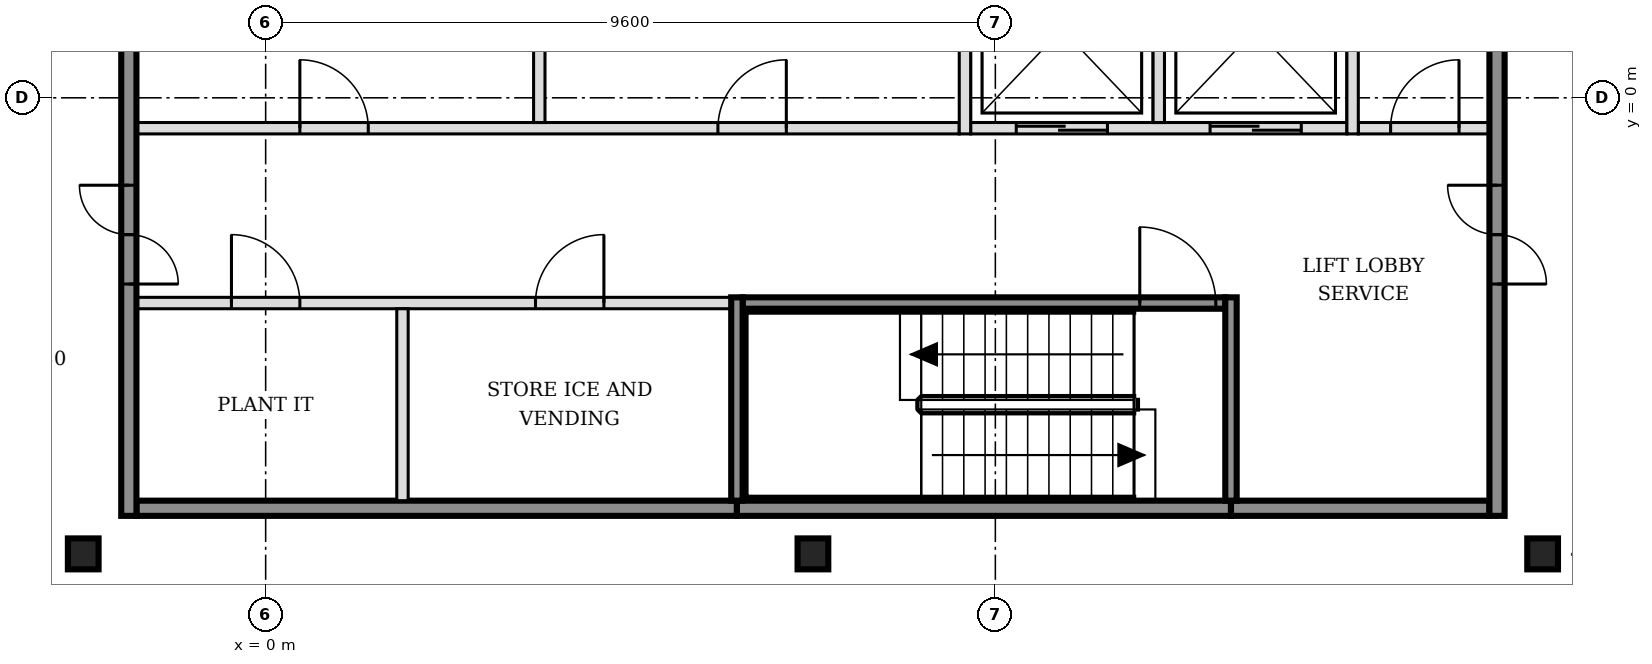
"""IFC4 building model, lengths in metres.
Left out: names, types, materials, properties, quantities, classifications, styles, units other than length and angle.
Written with IfcOpenShell. Run it as: python <this file> out.ifc"""

import sys

from ifc_helpers import new_model, si_unit, direction, frame, frame_2d, origin, origin_2d, place, context, subcontext, project, spatial, rectangle, i_section, extrude, element, fill, save


model = new_model("IFC4")
c1 = context("Model", 3, precision=1e-05, world=origin(), true_north=direction((0.0, 1.0)))
c2 = subcontext(c1, "Body", "Model", "MODEL_VIEW")
j1 = project(units=[si_unit("LENGTHUNIT", "METRE"), si_unit("PLANEANGLEUNIT", "RADIAN")], contexts=[c1])
p1 = place(None, origin())
s1 = spatial("IfcSite", under=j1, at=p1, CompositionType="ELEMENT")
p2 = place(p1, origin())
s2 = spatial("IfcBuilding", under=s1, at=p2, CompositionType="ELEMENT")
p3 = place(p2, frame((0.0, 0.0, 225.0)))
s3 = spatial("IfcBuildingStorey", under=s2, at=p3, CompositionType="ELEMENT", Elevation=225.0)
for number, where, z_axis, x_axis in (
    (1, (-2.4, -6.0, -0.15), (0.0, 0.0, 1.0), (1.0, 0.0, 0.0)),
    (2, (7.2, -6.0, -0.15), (0.0, 0.0, 1.0), (1.0, 0.0, 0.0)),
    (3, (16.8, -6.0, -0.15), (0.0, 0.0, 1.0), (1.0, 0.0, 0.0)),
):
    element("IfcColumn", number, at=place(p3, frame(where, z_axis=z_axis, x_axis=x_axis)), inside=s3, PredefinedType="COLUMN", context=c2, shape_type="SweptSolid", body=[
        extrude(i_section(OverallWidth=0.404, OverallDepth=0.407, WebThickness=0.027, FlangeThickness=0.044, FilletRadius=0.015, at=origin_2d()), origin(), (0.0, 0.0, 1.0), 3.6),
    ])
p4 = place(p3, frame((-1.7, -5.4, 0.0), z_axis=(0.0, 0.0, 1.0), x_axis=(1.0, 0.0, 0.0)))
e4 = element("IfcWall", 4, at=p4, inside=s3, PredefinedType="SOLIDWALL", context=c2, shape_type="SweptSolid", body=[
    extrude(rectangle(XDim=7.9, YDim=0.2, at=frame_2d((3.95, 0.0))), origin(), (0.0, 0.0, 1.0), 3.45),
])
p5 = place(p3, frame((6.2, -5.4, 0.0), z_axis=(0.0, 0.0, 1.0), x_axis=(1.0, 0.0, 0.0)))
e5 = element("IfcWall", 5, at=p5, inside=s3, PredefinedType="SOLIDWALL", context=c2, shape_type="SweptSolid", body=[
    extrude(rectangle(XDim=6.5, YDim=0.2, at=frame_2d((3.25, 0.0))), origin(), (0.0, 0.0, 1.0), 3.45),
])
p6 = place(p3, frame((12.7, -5.4, 0.0), z_axis=(0.0, 0.0, 1.0), x_axis=(1.0, 0.0, 0.0)))
e6 = element("IfcWall", 6, at=p6, inside=s3, PredefinedType="SOLIDWALL", context=c2, shape_type="SweptSolid", body=[
    extrude(rectangle(XDim=3.4, YDim=0.2, at=frame_2d((1.7, 0.0))), origin(), (0.0, 0.0, 1.0), 3.45),
])
p7 = place(p3, frame((-1.7, -2.7, 0.0), z_axis=(0.0, 0.0, 1.0), x_axis=(1.0, 0.0, 0.0)))
e7 = element("IfcWall", 7, at=p7, inside=s3, PredefinedType="PARTITIONING", context=c2, shape_type="SweptSolid", body=[
    extrude(rectangle(XDim=7.825, YDim=0.15, at=frame_2d((3.913, 0.0))), origin(), (0.0, 0.0, 1.0), 3.45),
])
p8 = place(p7, frame((1.25, 0.0, 0.0)))
e8 = element("IfcOpeningElement", 8, at=p8, cuts=e7, PredefinedType="OPENING", context=c2, shape_type="SweptSolid", body=[
    extrude(rectangle(XDim=0.9, YDim=2.1, at=frame_2d((0.45, 1.05))), frame((0.0, 0.085, 0.0), z_axis=(0.0, -1.0, 0.0), x_axis=(1.0, 0.0, 0.0)), (0.0, 0.0, 1.0), 0.17),
])
p9 = place(p7, frame((5.25, 0.0, 0.0)))
e9 = element("IfcOpeningElement", 9, at=p9, cuts=e7, PredefinedType="OPENING", context=c2, shape_type="SweptSolid", body=[
    extrude(rectangle(XDim=0.9, YDim=2.1, at=frame_2d((0.45, 1.05))), frame((0.0, 0.085, 0.0), z_axis=(0.0, -1.0, 0.0), x_axis=(1.0, 0.0, 0.0)), (0.0, 0.0, 1.0), 0.17),
])
p10 = place(p3, frame((6.275, -2.7, 0.0), z_axis=(0.0, 0.0, 1.0), x_axis=(1.0, 0.0, 0.0)))
e10 = element("IfcWall", 10, at=p10, inside=s3, PredefinedType="SOLIDWALL", context=c2, shape_type="SweptSolid", body=[
    extrude(rectangle(XDim=6.35, YDim=0.15, at=frame_2d((3.175, 0.0))), origin(), (0.0, 0.0, 1.0), 3.45),
])
p11 = place(p10, frame((5.225, 0.0, 0.0)))
e11 = element("IfcOpeningElement", 11, at=p11, cuts=e10, PredefinedType="OPENING", context=c2, shape_type="SweptSolid", body=[
    extrude(rectangle(XDim=1.0, YDim=2.1, at=frame_2d((0.5, 1.05))), frame((0.0, 0.085, 0.0), z_axis=(0.0, -1.0, 0.0), x_axis=(1.0, 0.0, 0.0)), (0.0, 0.0, 1.0), 0.17),
])
p12 = place(p3, frame((-1.7, -0.4, 0.0), z_axis=(0.0, 0.0, 1.0), x_axis=(1.0, 0.0, 0.0)))
e12 = element("IfcWall", 12, at=p12, inside=s3, PredefinedType="PARTITIONING", context=c2, shape_type="SweptSolid", body=[
    extrude(rectangle(XDim=10.825, YDim=0.15, at=frame_2d((5.413, 0.0))), origin(), (0.0, 0.0, 1.0), 3.45),
])
p13 = place(p12, frame((2.15, 0.0, 0.0)))
e13 = element("IfcOpeningElement", 13, at=p13, cuts=e12, PredefinedType="OPENING", context=c2, shape_type="SweptSolid", body=[
    extrude(rectangle(XDim=0.9, YDim=2.1, at=frame_2d((0.45, 1.05))), frame((0.0, 0.085, 0.0), z_axis=(0.0, -1.0, 0.0), x_axis=(1.0, 0.0, 0.0)), (0.0, 0.0, 1.0), 0.17),
])
p14 = place(p12, frame((7.65, 0.0, 0.0)))
e14 = element("IfcOpeningElement", 14, at=p14, cuts=e12, PredefinedType="OPENING", context=c2, shape_type="SweptSolid", body=[
    extrude(rectangle(XDim=0.9, YDim=2.1, at=frame_2d((0.45, 1.05))), frame((0.0, 0.085, 0.0), z_axis=(0.0, -1.0, 0.0), x_axis=(1.0, 0.0, 0.0)), (0.0, 0.0, 1.0), 0.17),
])
p15 = place(p3, frame((9.275, -0.4, 0.0), z_axis=(0.0, 0.0, 1.0), x_axis=(1.0, 0.0, 0.0)))
e15 = element("IfcWall", 15, at=p15, inside=s3, PredefinedType="SOLIDWALL", context=c2, shape_type="SweptSolid", body=[
    extrude(rectangle(XDim=4.95, YDim=0.15, at=frame_2d((2.475, 0.0))), origin(), (0.0, 0.0, 1.0), 3.45),
])
p16 = place(p15, frame((0.6, 0.0, 0.0)))
e16 = element("IfcOpeningElement", 16, at=p16, cuts=e15, PredefinedType="OPENING", context=c2, shape_type="SweptSolid", body=[
    extrude(rectangle(XDim=1.2, YDim=2.1, at=frame_2d((0.6, 1.05))), frame((0.0, 0.085, 0.0), z_axis=(0.0, -1.0, 0.0), x_axis=(1.0, 0.0, 0.0)), (0.0, 0.0, 1.0), 0.17),
])
p17 = place(p15, frame((3.15, 0.0, 0.0)))
e17 = element("IfcOpeningElement", 17, at=p17, cuts=e15, PredefinedType="OPENING", context=c2, shape_type="SweptSolid", body=[
    extrude(rectangle(XDim=1.2, YDim=2.1, at=frame_2d((0.6, 1.05))), frame((0.0, 0.085, 0.0), z_axis=(0.0, -1.0, 0.0), x_axis=(1.0, 0.0, 0.0)), (0.0, 0.0, 1.0), 0.17),
])
p18 = place(p3, frame((14.375, -0.4, 0.0), z_axis=(0.0, 0.0, 1.0), x_axis=(1.0, 0.0, 0.0)))
e18 = element("IfcWall", 18, at=p18, inside=s3, PredefinedType="PARTITIONING", context=c2, shape_type="SweptSolid", body=[
    extrude(rectangle(XDim=1.725, YDim=0.15, at=frame_2d((0.863, 0.0))), origin(), (0.0, 0.0, 1.0), 3.45),
])
p19 = place(p18, frame((0.425, 0.0, 0.0)))
e19 = element("IfcOpeningElement", 19, at=p19, cuts=e18, PredefinedType="OPENING", context=c2, shape_type="SweptSolid", body=[
    extrude(rectangle(XDim=0.9, YDim=2.1, at=frame_2d((0.45, 1.05))), frame((0.0, 0.085, 0.0), z_axis=(0.0, -1.0, 0.0), x_axis=(1.0, 0.0, 0.0)), (0.0, 0.0, 1.0), 0.17),
])
p20 = place(p3, frame((-1.8, -5.5, 0.0), z_axis=(0.0, 0.0, 1.0), x_axis=(0.0, 1.0, 0.0)))
e20 = element("IfcWall", 20, at=p20, inside=s3, PredefinedType="SOLIDWALL", context=c2, shape_type="SweptSolid", body=[
    extrude(rectangle(XDim=15.8, YDim=0.2, at=frame_2d((7.9, 0.0))), origin(), (0.0, 0.0, 1.0), 3.45),
])
p21 = place(p20, frame((3.05, 0.0, 0.0)))
e21 = element("IfcOpeningElement", 21, at=p21, cuts=e20, PredefinedType="OPENING", context=c2, shape_type="SweptSolid", body=[
    extrude(rectangle(XDim=1.3, YDim=2.1, at=frame_2d((0.65, 1.05))), frame((0.0, 0.11, 0.0), z_axis=(0.0, -1.0, 0.0), x_axis=(1.0, 0.0, 0.0)), (0.0, 0.0, 1.0), 0.22),
])
p22 = place(p20, frame((11.45, 0.0, 0.0)))
e22 = element("IfcOpeningElement", 22, at=p22, cuts=e20, PredefinedType="OPENING", context=c2, shape_type="SweptSolid", body=[
    extrude(rectangle(XDim=1.3, YDim=2.1, at=frame_2d((0.65, 1.05))), frame((0.0, 0.11, 0.0), z_axis=(0.0, -1.0, 0.0), x_axis=(1.0, 0.0, 0.0)), (0.0, 0.0, 1.0), 0.22),
])
p23 = place(p3, frame((1.8, -5.3, 0.0), z_axis=(0.0, 0.0, 1.0), x_axis=(0.0, 1.0, 0.0)))
e23 = element("IfcWall", 23, at=p23, inside=s3, PredefinedType="PARTITIONING", context=c2, shape_type="SweptSolid", body=[
    extrude(rectangle(XDim=2.525, YDim=0.15, at=frame_2d((1.263, 0.0))), origin(), (0.0, 0.0, 1.0), 3.45),
])
p24 = place(p3, frame((3.6, -0.325, 0.0), z_axis=(0.0, 0.0, 1.0), x_axis=(0.0, 1.0, 0.0)))
e24 = element("IfcWall", 24, at=p24, inside=s3, PredefinedType="PARTITIONING", context=c2, shape_type="SweptSolid", body=[
    extrude(rectangle(XDim=2.45, YDim=0.15, at=frame_2d((1.225, 0.0))), origin(), (0.0, 0.0, 1.0), 3.45),
])
p25 = place(p3, frame((6.2, -5.3, 0.0), z_axis=(0.0, 0.0, 1.0), x_axis=(0.0, 1.0, 0.0)))
e25 = element("IfcWall", 25, at=p25, inside=s3, PredefinedType="SOLIDWALL", context=c2, shape_type="SweptSolid", body=[
    extrude(rectangle(XDim=2.675, YDim=0.15, at=frame_2d((1.337, 0.0))), origin(), (0.0, 0.0, 1.0), 3.45),
])
p26 = place(p3, frame((9.2, -0.475, 0.0), z_axis=(0.0, 0.0, 1.0), x_axis=(0.0, 1.0, 0.0)))
e26 = element("IfcWall", 26, at=p26, inside=s3, PredefinedType="SOLIDWALL", context=c2, shape_type="SweptSolid", body=[
    extrude(rectangle(XDim=2.6, YDim=0.15, at=frame_2d((1.3, 0.0))), origin(), (0.0, 0.0, 1.0), 3.45),
])
p27 = place(p3, frame((11.75, -0.325, 0.0), z_axis=(0.0, 0.0, 1.0), x_axis=(0.0, 1.0, 0.0)))
e27 = element("IfcWall", 27, at=p27, inside=s3, PredefinedType="SOLIDWALL", context=c2, shape_type="SweptSolid", body=[
    extrude(rectangle(XDim=2.45, YDim=0.15, at=frame_2d((1.225, 0.0))), origin(), (0.0, 0.0, 1.0), 3.45),
])
p28 = place(p3, frame((12.7, -5.3, 0.0), z_axis=(0.0, 0.0, 1.0), x_axis=(0.0, 1.0, 0.0)))
e28 = element("IfcWall", 28, at=p28, inside=s3, PredefinedType="SOLIDWALL", context=c2, shape_type="SweptSolid", body=[
    extrude(rectangle(XDim=2.675, YDim=0.15, at=frame_2d((1.337, 0.0))), origin(), (0.0, 0.0, 1.0), 3.45),
])
p29 = place(p3, frame((14.3, -0.475, 0.0), z_axis=(0.0, 0.0, 1.0), x_axis=(0.0, 1.0, 0.0)))
e29 = element("IfcWall", 29, at=p29, inside=s3, PredefinedType="SOLIDWALL", context=c2, shape_type="SweptSolid", body=[
    extrude(rectangle(XDim=2.75, YDim=0.15, at=frame_2d((1.375, 0.0))), origin(), (0.0, 0.0, 1.0), 3.45),
])
p30 = place(p3, frame((16.2, -5.5, 0.0), z_axis=(0.0, 0.0, 1.0), x_axis=(0.0, 1.0, 0.0)))
e30 = element("IfcWall", 30, at=p30, inside=s3, PredefinedType="SOLIDWALL", context=c2, shape_type="SweptSolid", body=[
    extrude(rectangle(XDim=15.8, YDim=0.2, at=frame_2d((7.9, 0.0))), origin(), (0.0, 0.0, 1.0), 3.45),
])
p31 = place(p30, frame((3.05, 0.0, 0.0)))
e31 = element("IfcOpeningElement", 31, at=p31, cuts=e30, PredefinedType="OPENING", context=c2, shape_type="SweptSolid", body=[
    extrude(rectangle(XDim=1.3, YDim=2.1, at=frame_2d((0.65, 1.05))), frame((0.0, 0.11, 0.0), z_axis=(0.0, -1.0, 0.0), x_axis=(1.0, 0.0, 0.0)), (0.0, 0.0, 1.0), 0.22),
])
p32 = place(p30, frame((11.45, 0.0, 0.0)))
e32 = element("IfcOpeningElement", 32, at=p32, cuts=e30, PredefinedType="OPENING", context=c2, shape_type="SweptSolid", body=[
    extrude(rectangle(XDim=1.3, YDim=2.1, at=frame_2d((0.65, 1.05))), frame((0.0, 0.11, 0.0), z_axis=(0.0, -1.0, 0.0), x_axis=(1.0, 0.0, 0.0)), (0.0, 0.0, 1.0), 0.22),
])
p33 = place(p3, frame((16.722, -14.272, 0.0), z_axis=(0.0, 0.0, 1.0), x_axis=(0.707106781187, 0.707106781187, 0.0)))
e33 = element("IfcWall", 33, at=p33, inside=s3, PredefinedType="PARTITIONING", context=c2, shape_type="SweptSolid", body=[
    extrude(rectangle(XDim=20.049, YDim=0.15, at=frame_2d((10.025, 0.0))), origin(), (0.0, 0.0, 1.0), 2.73),
])
p34 = place(p33, frame((4.892, 0.0, 0.0)))
e34 = element("IfcOpeningElement", 34, at=p34, cuts=e33, PredefinedType="OPENING", context=c2, shape_type="SweptSolid", body=[
    extrude(rectangle(XDim=0.9, YDim=2.1, at=frame_2d((0.45, 1.05))), frame((0.0, 0.085, 0.0), z_axis=(0.0, -1.0, 0.0), x_axis=(1.0, 0.0, 0.0)), (0.0, 0.0, 1.0), 0.17),
])
p35 = place(p33, frame((10.042, 0.0, 0.0)))
e35 = element("IfcOpeningElement", 35, at=p35, cuts=e33, PredefinedType="OPENING", context=c2, shape_type="SweptSolid", body=[
    extrude(rectangle(XDim=0.9, YDim=2.1, at=frame_2d((0.45, 1.05))), frame((0.0, 0.085, 0.0), z_axis=(0.0, -1.0, 0.0), x_axis=(1.0, 0.0, 0.0)), (0.0, 0.0, 1.0), 0.17),
])
p36 = place(p33, frame((14.443, 0.0, 0.0)))
e36 = element("IfcOpeningElement", 36, at=p36, cuts=e33, PredefinedType="OPENING", context=c2, shape_type="SweptSolid", body=[
    extrude(rectangle(XDim=0.9, YDim=2.1, at=frame_2d((0.45, 1.05))), frame((0.0, 0.085, 0.0), z_axis=(0.0, -1.0, 0.0), x_axis=(1.0, 0.0, 0.0)), (0.0, 0.0, 1.0), 0.17),
])
p37 = place(p33, frame((17.837, 0.0, 0.0)))
e37 = element("IfcOpeningElement", 37, at=p37, cuts=e33, PredefinedType="OPENING", context=c2, shape_type="SweptSolid", body=[
    extrude(rectangle(XDim=0.9, YDim=2.1, at=frame_2d((0.45, 1.05))), frame((0.0, 0.085, 0.0), z_axis=(0.0, -1.0, 0.0), x_axis=(1.0, 0.0, 0.0)), (0.0, 0.0, 1.0), 0.17),
])
p38 = place(p16, origin())
e38 = element("IfcDoor", 38, at=p38, inside=s3, OperationType="DOUBLE_DOOR_SLIDING", PredefinedType="DOOR", context=c2, shape_type="SweptSolid", body=[
    extrude(rectangle(XDim=1.2, YDim=2.1, at=frame_2d((0.6, 1.05))), frame((0.0, 0.025, 0.0), z_axis=(0.0, -1.0, 0.0), x_axis=(1.0, 0.0, 0.0)), (0.0, 0.0, 1.0), 0.05),
])
fill(e16, e38)
p39 = place(p17, origin())
e39 = element("IfcDoor", 39, at=p39, inside=s3, OperationType="DOUBLE_DOOR_SLIDING", PredefinedType="DOOR", context=c2, shape_type="SweptSolid", body=[
    extrude(rectangle(XDim=1.2, YDim=2.1, at=frame_2d((0.6, 1.05))), frame((0.0, 0.025, 0.0), z_axis=(0.0, -1.0, 0.0), x_axis=(1.0, 0.0, 0.0)), (0.0, 0.0, 1.0), 0.05),
])
fill(e17, e39)
p40 = place(p11, origin())
e40 = element("IfcDoor", 40, at=p40, inside=s3, OperationType="SINGLE_SWING_LEFT", PredefinedType="DOOR", context=c2, shape_type="SweptSolid", body=[
    extrude(rectangle(XDim=1.0, YDim=2.1, at=frame_2d((0.5, 1.05))), frame((0.0, 0.025, 0.0), z_axis=(0.0, -1.0, 0.0), x_axis=(1.0, 0.0, 0.0)), (0.0, 0.0, 1.0), 0.05),
])
fill(e11, e40)
p41 = place(p21, origin())
e41 = element("IfcDoor", 41, at=p41, inside=s3, OperationType="DOUBLE_DOOR_SINGLE_SWING", PredefinedType="DOOR", context=c2, shape_type="SweptSolid", body=[
    extrude(rectangle(XDim=1.3, YDim=2.1, at=frame_2d((0.65, 1.05))), frame((0.0, 0.025, 0.0), z_axis=(0.0, -1.0, 0.0), x_axis=(1.0, 0.0, 0.0)), (0.0, 0.0, 1.0), 0.05),
])
fill(e21, e41)
p42 = place(p31, origin())
e42 = element("IfcDoor", 42, at=p42, inside=s3, OperationType="DOUBLE_DOOR_SINGLE_SWING", PredefinedType="DOOR", context=c2, shape_type="SweptSolid", body=[
    extrude(rectangle(XDim=1.3, YDim=2.1, at=frame_2d((0.65, 1.05))), frame((0.0, 0.025, 0.0), z_axis=(0.0, -1.0, 0.0), x_axis=(1.0, 0.0, 0.0)), (0.0, 0.0, 1.0), 0.05),
])
fill(e31, e42)
p43 = place(p19, origin())
e43 = element("IfcDoor", 43, at=p43, inside=s3, OperationType="SINGLE_SWING_RIGHT", PredefinedType="DOOR", context=c2, shape_type="SweptSolid", body=[
    extrude(rectangle(XDim=0.9, YDim=2.1, at=frame_2d((0.45, 1.05))), frame((0.0, 0.025, 0.0), z_axis=(0.0, -1.0, 0.0), x_axis=(1.0, 0.0, 0.0)), (0.0, 0.0, 1.0), 0.05),
])
fill(e19, e43)
p44 = place(p8, origin())
e44 = element("IfcDoor", 44, at=p44, inside=s3, OperationType="SINGLE_SWING_LEFT", PredefinedType="DOOR", context=c2, shape_type="SweptSolid", body=[
    extrude(rectangle(XDim=0.9, YDim=2.1, at=frame_2d((0.45, 1.05))), frame((0.0, 0.025, 0.0), z_axis=(0.0, -1.0, 0.0), x_axis=(1.0, 0.0, 0.0)), (0.0, 0.0, 1.0), 0.05),
])
fill(e8, e44)
p45 = place(p9, origin())
e45 = element("IfcDoor", 45, at=p45, inside=s3, OperationType="SINGLE_SWING_RIGHT", PredefinedType="DOOR", context=c2, shape_type="SweptSolid", body=[
    extrude(rectangle(XDim=0.9, YDim=2.1, at=frame_2d((0.45, 1.05))), frame((0.0, 0.025, 0.0), z_axis=(0.0, -1.0, 0.0), x_axis=(1.0, 0.0, 0.0)), (0.0, 0.0, 1.0), 0.05),
])
fill(e9, e45)
p46 = place(p13, origin())
e46 = element("IfcDoor", 46, at=p46, inside=s3, OperationType="SINGLE_SWING_LEFT", PredefinedType="DOOR", context=c2, shape_type="SweptSolid", body=[
    extrude(rectangle(XDim=0.9, YDim=2.1, at=frame_2d((0.45, 1.05))), frame((0.0, 0.025, 0.0), z_axis=(0.0, -1.0, 0.0), x_axis=(1.0, 0.0, 0.0)), (0.0, 0.0, 1.0), 0.05),
])
fill(e13, e46)
p47 = place(p14, origin())
e47 = element("IfcDoor", 47, at=p47, inside=s3, OperationType="SINGLE_SWING_RIGHT", PredefinedType="DOOR", context=c2, shape_type="SweptSolid", body=[
    extrude(rectangle(XDim=0.9, YDim=2.1, at=frame_2d((0.45, 1.05))), frame((0.0, 0.025, 0.0), z_axis=(0.0, -1.0, 0.0), x_axis=(1.0, 0.0, 0.0)), (0.0, 0.0, 1.0), 0.05),
])
fill(e14, e47)
save(model, sys.argv[1])
